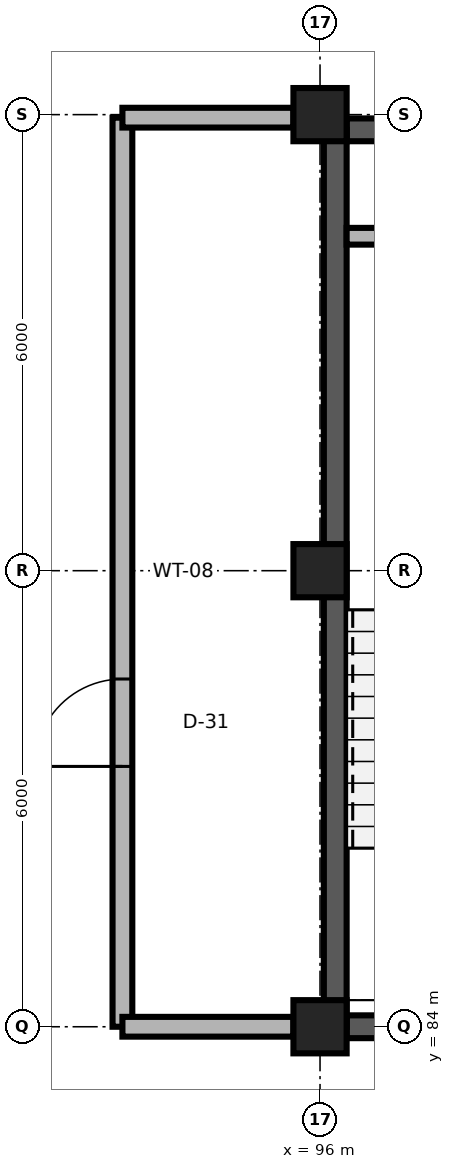
"""IFC4 building model, lengths in metres.
Left out: names, types, materials, properties, quantities, classifications, styles, units other than length and angle.
Written with IfcOpenShell. Run it as: python <this file> out.ifc"""

import sys

from ifc_helpers import new_model, si_unit, direction, frame, frame_2d, origin, origin_2d, place, context, subcontext, project, spatial, rectangle, extrude, element, fill, save


model = new_model("IFC4")
c1 = context("Model", 3, precision=1e-05, world=origin(), true_north=direction((0.0, 1.0)))
c2 = subcontext(c1, "Body", "Model", "MODEL_VIEW")
j1 = project(units=[si_unit("LENGTHUNIT", "METRE"), si_unit("PLANEANGLEUNIT", "RADIAN")], contexts=[c1])
p1 = place(None, origin())
s1 = spatial("IfcSite", under=j1, at=p1, CompositionType="ELEMENT")
p2 = place(p1, origin())
s2 = spatial("IfcBuilding", under=s1, at=p2, CompositionType="ELEMENT")
p3 = place(p2, frame((0.0, 0.0, 56.1)))
s3 = spatial("IfcBuildingStorey", under=s2, at=p3, CompositionType="ELEMENT", Elevation=56.1)
for number, where, z_axis, x_axis in (
    (1, (96.0, 84.0, 0.0), (0.0, 0.0, 1.0), (1.0, 0.0, 0.0)),
    (2, (96.0, 90.0, 0.0), (0.0, 0.0, 1.0), (1.0, 0.0, 0.0)),
    (3, (96.0, 96.0, 0.0), (0.0, 0.0, 1.0), (1.0, 0.0, 0.0)),
):
    element("IfcColumn", number, at=place(p3, frame(where, z_axis=z_axis, x_axis=x_axis)), inside=s3, PredefinedType="COLUMN", context=c2, shape_type="SweptSolid", body=[
        extrude(rectangle(XDim=0.7, YDim=0.7, at=origin_2d()), origin(), (0.0, 0.0, 1.0), 3.9),
    ])
p4 = place(p3, frame((96.35, 84.0, 0.0), z_axis=(0.0, 0.0, 1.0), x_axis=(1.0, 0.0, 0.0)))
e4 = element("IfcWall", 4, at=p4, inside=s3, PredefinedType="SHEAR", context=c2, shape_type="SweptSolid", body=[
    extrude(rectangle(XDim=5.3, YDim=0.3, at=frame_2d((2.65, 0.0))), origin(), (0.0, 0.0, 1.0), 3.66),
])
p5 = place(p4, frame((1.975, 0.0, 0.0)))
e5 = element("IfcOpeningElement", 5, at=p5, cuts=e4, PredefinedType="OPENING", context=c2, shape_type="SweptSolid", body=[
    extrude(rectangle(XDim=1.35, YDim=2.2, at=frame_2d((0.675, 1.1))), frame((0.0, 0.165, 0.0), z_axis=(0.0, -1.0, 0.0), x_axis=(1.0, 0.0, 0.0)), (0.0, 0.0, 1.0), 0.33),
])
p6 = place(p3, frame((96.35, 95.8, 0.0), z_axis=(0.0, 0.0, 1.0), x_axis=(1.0, 0.0, 0.0)))
e6 = element("IfcWall", 6, at=p6, inside=s3, PredefinedType="SHEAR", context=c2, shape_type="SweptSolid", body=[
    extrude(rectangle(XDim=5.3, YDim=0.3, at=frame_2d((2.65, 0.0))), origin(), (0.0, 0.0, 1.0), 3.74),
])
p7 = place(p3, frame((96.2, 84.0, 0.0), z_axis=(0.0, 0.0, 1.0), x_axis=(0.0, 1.0, 0.0)))
e7 = element("IfcWall", 7, at=p7, inside=s3, PredefinedType="SHEAR", context=c2, shape_type="SweptSolid", body=[
    extrude(rectangle(XDim=11.8, YDim=0.3, at=frame_2d((5.9, 0.0))), origin(), (0.0, 0.0, 1.0), 3.74),
])
p8 = place(p3, frame((96.35, 94.4, 0.0), z_axis=(0.0, 0.0, 1.0), x_axis=(1.0, 0.0, 0.0)))
e8 = element("IfcWall", 8, at=p8, inside=s3, PredefinedType="PARTITIONING", context=c2, shape_type="SweptSolid", body=[
    extrude(rectangle(XDim=1.1, YDim=0.22, at=frame_2d((0.55, 0.0))), origin(), (0.0, 0.0, 1.0), 3.74),
])
p9 = place(p3, frame((93.4, 84.0, 0.0), z_axis=(0.0, 0.0, 1.0), x_axis=(0.0, 1.0, 0.0)))
e9 = element("IfcWall", 9, at=p9, inside=s3, PredefinedType="PARTITIONING", context=c2, shape_type="SweptSolid", body=[
    extrude(rectangle(XDim=11.96, YDim=0.26, at=frame_2d((5.98, 0.0))), origin(), (0.0, 0.0, 1.0), 3.74),
])
p10 = place(p9, frame((3.425, 0.0, 0.0)))
e10 = element("IfcOpeningElement", 10, at=p10, cuts=e9, PredefinedType="OPENING", context=c2, shape_type="SweptSolid", body=[
    extrude(rectangle(XDim=1.15, YDim=2.2, at=frame_2d((0.575, 1.1))), frame((0.0, 0.145, 0.0), z_axis=(0.0, -1.0, 0.0), x_axis=(1.0, 0.0, 0.0)), (0.0, 0.0, 1.0), 0.29),
])
for number, where, z_axis, x_axis in (
    (11, (93.4, 84.0, 0.0), (0.0, 0.0, 1.0), (1.0, 0.0, 0.0)),
    (12, (93.4, 95.96, 0.0), (0.0, 0.0, 1.0), (1.0, 0.0, 0.0)),
):
    element("IfcWall", number, at=place(p3, frame(where, z_axis=z_axis, x_axis=x_axis)), inside=s3, PredefinedType="PARTITIONING", context=c2, shape_type="SweptSolid", body=[
        extrude(rectangle(XDim=2.25, YDim=0.26, at=frame_2d((1.125, 0.0))), origin(), (0.0, 0.0, 1.0), 3.449),
    ])
p11 = place(p10, origin())
e13 = element("IfcDoor", 13, at=p11, inside=s3, OperationType="SINGLE_SWING_LEFT", PredefinedType="DOOR", context=c2, shape_type="SweptSolid", body=[
    extrude(rectangle(XDim=1.15, YDim=2.2, at=frame_2d((0.575, 1.1))), frame((0.0, 0.025, 0.0), z_axis=(0.0, -1.0, 0.0), x_axis=(1.0, 0.0, 0.0)), (0.0, 0.0, 1.0), 0.05),
])
fill(e10, e13)
save(model, sys.argv[1])
